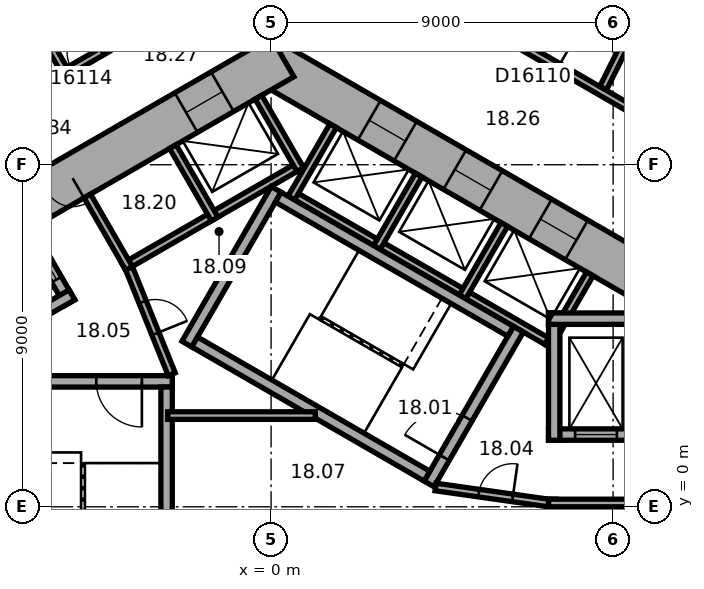
"""IFC4 building model, lengths in metres.
Left out: names, types, materials, properties, quantities, classifications, styles, units other than length and angle.
Written with IfcOpenShell. Run it as: python <this file> out.ifc"""

import sys

from ifc_helpers import new_model, si_unit, direction, frame, frame_2d, origin, place, context, subcontext, project, spatial, rectangle, extrude, element, fill, save


model = new_model("IFC4")
c1 = context("Model", 3, precision=1e-05, world=origin(), true_north=direction((0.0, 1.0)))
c2 = subcontext(c1, "Body", "Model", "MODEL_VIEW")
j1 = project(units=[si_unit("LENGTHUNIT", "METRE"), si_unit("PLANEANGLEUNIT", "RADIAN")], contexts=[c1])
p1 = place(None, origin())
s1 = spatial("IfcSite", under=j1, at=p1, CompositionType="ELEMENT")
p2 = place(p1, origin())
s2 = spatial("IfcBuilding", under=s1, at=p2, CompositionType="ELEMENT")
p3 = place(p2, frame((0.0, 0.0, 83.6)))
s3 = spatial("IfcBuildingStorey", under=s2, at=p3, CompositionType="ELEMENT", Elevation=83.6)
p4 = place(p3, frame((10.4, 5.658, 0.0), z_axis=(0.0, 0.0, 1.0), x_axis=(-0.866021384402, 0.500006961711, 0.0)))
e1 = element("IfcWall", 1, at=p4, inside=s3, PredefinedType="SHEAR", context=c2, shape_type="SweptSolid", body=[
    extrude(rectangle(XDim=12.355, YDim=1.2, at=frame_2d((6.178, 0.0))), origin(), (0.0, 0.0, 1.0), 3.3),
])
p5 = place(p4, frame((2.728, 0.0, 0.0)))
e2 = element("IfcOpeningElement", 2, at=p5, cuts=e1, PredefinedType="OPENING", context=c2, shape_type="SweptSolid", body=[
    extrude(rectangle(XDim=1.1, YDim=2.1, at=frame_2d((0.55, 1.05))), frame((0.0, 0.61, 0.0), z_axis=(0.0, -1.0, 0.0), x_axis=(1.0, 0.0, 0.0)), (0.0, 0.0, 1.0), 1.22),
])
p6 = place(p4, frame((5.328, 0.0, 0.0)))
e3 = element("IfcOpeningElement", 3, at=p6, cuts=e1, PredefinedType="OPENING", context=c2, shape_type="SweptSolid", body=[
    extrude(rectangle(XDim=1.1, YDim=2.1, at=frame_2d((0.55, 1.05))), frame((0.0, 0.61, 0.0), z_axis=(0.0, -1.0, 0.0), x_axis=(1.0, 0.0, 0.0)), (0.0, 0.0, 1.0), 1.22),
])
p7 = place(p4, frame((7.928, 0.0, 0.0)))
e4 = element("IfcOpeningElement", 4, at=p7, cuts=e1, PredefinedType="OPENING", context=c2, shape_type="SweptSolid", body=[
    extrude(rectangle(XDim=1.1, YDim=2.1, at=frame_2d((0.55, 1.05))), frame((0.0, 0.61, 0.0), z_axis=(0.0, -1.0, 0.0), x_axis=(1.0, 0.0, 0.0)), (0.0, 0.0, 1.0), 1.22),
])
p8 = place(p3, frame((0.3, 11.836, 0.0), z_axis=(0.0, 0.0, 1.0), x_axis=(-0.866021384402, -0.500006961711, 0.0)))
e5 = element("IfcWall", 5, at=p8, inside=s3, PredefinedType="SHEAR", context=c2, shape_type="SweptSolid", body=[
    extrude(rectangle(XDim=12.355, YDim=1.2, at=frame_2d((6.178, 0.0))), origin(), (0.0, 0.0, 1.0), 3.3),
])
p9 = place(p8, frame((6.378, 0.0, 0.0)))
e6 = element("IfcOpeningElement", 6, at=p9, cuts=e5, PredefinedType="OPENING", context=c2, shape_type="SweptSolid", body=[
    extrude(rectangle(XDim=1.5, YDim=2.1, at=frame_2d((0.75, 1.05))), frame((0.0, 0.61, 0.0), z_axis=(0.0, -1.0, 0.0), x_axis=(1.0, 0.0, 0.0)), (0.0, 0.0, 1.0), 1.22),
])
p10 = place(p8, frame((1.828, 0.0, 0.0)))
e7 = element("IfcOpeningElement", 7, at=p10, cuts=e5, PredefinedType="OPENING", context=c2, shape_type="SweptSolid", body=[
    extrude(rectangle(XDim=1.1, YDim=2.1, at=frame_2d((0.55, 1.05))), frame((0.0, 0.61, 0.0), z_axis=(0.0, -1.0, 0.0), x_axis=(1.0, 0.0, 0.0)), (0.0, 0.0, 1.0), 1.22),
])
p11 = place(p3, frame((7.4, -5.2, 0.0), z_axis=(0.0, 0.0, 1.0), x_axis=(0.0, 1.0, 0.0)))
e8 = element("IfcWall", 8, at=p11, inside=s3, PredefinedType="PARTITIONING", context=c2, shape_type="SweptSolid", body=[
    extrude(rectangle(XDim=5.4, YDim=0.2, at=frame_2d((2.7, 0.0))), origin(), (0.0, 0.0, 1.0), 3.05),
])
p12 = place(p3, frame((7.3, 0.1, 0.0), z_axis=(0.0, 0.0, 1.0), x_axis=(1.0, 0.0, 0.0)))
e9 = element("IfcWall", 9, at=p12, inside=s3, PredefinedType="PARTITIONING", context=c2, shape_type="SweptSolid", body=[
    extrude(rectangle(XDim=2.2, YDim=0.2, at=frame_2d((1.1, 0.0))), origin(), (0.0, 0.0, 1.0), 3.05),
])
p13 = place(p3, frame((7.424, 4.259, 0.0), z_axis=(0.0, 0.0, 1.0), x_axis=(-0.866026010844, 0.49999894854, 0.0)))
e10 = element("IfcWall", 10, at=p13, inside=s3, PredefinedType="PARTITIONING", context=c2, shape_type="SweptSolid", body=[
    extrude(rectangle(XDim=8.0, YDim=0.2, at=frame_2d((4.0, 0.0))), origin(), (0.0, 0.0, 1.0), 3.05),
])
for number, where, z_axis, x_axis in (
    (11, (7.287, 4.222, 0.0), (0.0, 0.0, 1.0), (0.5, 0.866, 0.0)),
    (12, (5.036, 5.522, 0.0), (0.0, 0.0, 1.0), (0.5, 0.866, 0.0)),
    (13, (2.784, 6.822, 0.0), (0.0, 0.0, 1.0), (0.5, 0.866, 0.0)),
    (14, (0.532, 8.122, 0.0), (0.0, 0.0, 1.0), (0.5, 0.866, 0.0)),
):
    element("IfcWall", number, at=place(p3, frame(where, z_axis=z_axis, x_axis=x_axis)), inside=s3, PredefinedType="PARTITIONING", context=c2, shape_type="SweptSolid", body=[
        extrude(rectangle(XDim=2.2, YDim=0.2, at=frame_2d((1.1, 0.0))), origin(), (0.0, 0.0, 1.0), 3.05),
    ])
p14 = place(p3, frame((0.803, 9.009, 0.0), z_axis=(0.0, 0.0, 1.0), x_axis=(-0.866028230842, -0.499995103361, 0.0)))
e15 = element("IfcWall", 15, at=p14, inside=s3, PredefinedType="PARTITIONING", context=c2, shape_type="SweptSolid", body=[
    extrude(rectangle(XDim=5.4, YDim=0.2, at=frame_2d((2.7, 0.0))), origin(), (0.0, 0.0, 1.0), 3.05),
])
p15 = place(p3, frame((0.767, 8.872, 0.0), z_axis=(0.0, 0.0, 1.0), x_axis=(-0.499994660107, 0.866028486751, 0.0)))
e16 = element("IfcWall", 16, at=p15, inside=s3, PredefinedType="PARTITIONING", context=c2, shape_type="SweptSolid", body=[
    extrude(rectangle(XDim=2.2, YDim=0.2, at=frame_2d((1.1, 0.0))), origin(), (0.0, 0.0, 1.0), 3.05),
])
for number, where, z_axis, x_axis in (
    (17, (-1.485, 7.572, 0.0), (0.0, 0.0, 1.0), (-0.5, 0.866, 0.0)),
    (18, (-3.737, 6.272, 0.0), (0.0, 0.0, 1.0), (-0.5, 0.866, 0.0)),
):
    element("IfcWall", number, at=place(p3, frame(where, z_axis=z_axis, x_axis=x_axis)), inside=s3, PredefinedType="PARTITIONING", context=c2, shape_type="SweptSolid", body=[
        extrude(rectangle(XDim=2.2, YDim=0.2, at=frame_2d((1.1, 0.0))), origin(), (0.0, 0.0, 1.0), 3.05),
    ])
p16 = place(p3, frame((4.158, 0.602, 0.0), z_axis=(0.0, 0.0, 1.0), x_axis=(0.499977259774, 0.866038532462, 0.0)))
e19 = element("IfcWall", 19, at=p16, inside=s3, PredefinedType="SHEAR", context=c2, shape_type="SweptSolid", body=[
    extrude(rectangle(XDim=4.7, YDim=0.3, at=frame_2d((2.35, 0.0))), origin(), (0.0, 0.0, 1.0), 3.05),
])
p17 = place(p16, frame((0.8, 0.0, 0.0)))
e20 = element("IfcOpeningElement", 20, at=p17, cuts=e19, PredefinedType="OPENING", context=c2, shape_type="SweptSolid", body=[
    extrude(rectangle(XDim=1.2, YDim=2.1, at=frame_2d((0.6, 1.05))), frame((0.0, 0.16, 0.0), z_axis=(0.0, -1.0, 0.0), x_axis=(1.0, 0.0, 0.0)), (0.0, 0.0, 1.0), 0.32),
])
p18 = place(p3, frame((-2.216, 4.282, 0.0), z_axis=(0.0, 0.0, 1.0), x_axis=(0.499977259774, 0.866038532462, 0.0)))
e21 = element("IfcWall", 21, at=p18, inside=s3, PredefinedType="SHEAR", context=c2, shape_type="SweptSolid", body=[
    extrude(rectangle(XDim=4.7, YDim=0.3, at=frame_2d((2.35, 0.0))), origin(), (0.0, 0.0, 1.0), 3.05),
])
for number, where, z_axis, x_axis in (
    (22, (4.103, 0.807, 0.0), (0.0, 0.0, 1.0), (-0.866, 0.5, 0.0)),
    (23, (6.303, 4.617, 0.0), (0.0, 0.0, 1.0), (-0.866, 0.5, 0.0)),
):
    element("IfcWall", number, at=place(p3, frame(where, z_axis=z_axis, x_axis=x_axis)), inside=s3, PredefinedType="SHEAR", context=c2, shape_type="SweptSolid", body=[
        extrude(rectangle(XDim=7.06, YDim=0.3, at=frame_2d((3.53, 0.0))), origin(), (0.0, 0.0, 1.0), 3.05),
    ])
p19 = place(p3, frame((-2.6, 3.3, 0.0), z_axis=(0.0, 0.0, 1.0), x_axis=(-1.0, 0.0, 0.0)))
e24 = element("IfcWall", 24, at=p19, inside=s3, PredefinedType="SHEAR", context=c2, shape_type="SweptSolid", body=[
    extrude(rectangle(XDim=4.7, YDim=0.3, at=frame_2d((2.35, 0.0))), origin(), (0.0, 0.0, 1.0), 3.05),
])
p20 = place(p19, frame((0.8, 0.0, 0.0)))
e25 = element("IfcOpeningElement", 25, at=p20, cuts=e24, PredefinedType="OPENING", context=c2, shape_type="SweptSolid", body=[
    extrude(rectangle(XDim=1.2, YDim=2.1, at=frame_2d((0.6, 1.05))), frame((0.0, 0.16, 0.0), z_axis=(0.0, -1.0, 0.0), x_axis=(1.0, 0.0, 0.0)), (0.0, 0.0, 1.0), 0.32),
])
p21 = place(p3, frame((-2.75, 3.15, 0.0), z_axis=(0.0, 0.0, 1.0), x_axis=(0.0, -1.0, 0.0)))
e26 = element("IfcWall", 26, at=p21, inside=s3, PredefinedType="SHEAR", context=c2, shape_type="SweptSolid", body=[
    extrude(rectangle(XDim=7.06, YDim=0.3, at=frame_2d((3.53, 0.0))), origin(), (0.0, 0.0, 1.0), 3.05),
])
p22 = place(p3, frame((7.3, 1.9, 0.0), z_axis=(0.0, 0.0, 1.0), x_axis=(1.0, 0.0, 0.0)))
e27 = element("IfcWall", 27, at=p22, inside=s3, PredefinedType="SHEAR", context=c2, shape_type="SweptSolid", body=[
    extrude(rectangle(XDim=2.2, YDim=0.3, at=frame_2d((1.1, 0.0))), origin(), (0.0, 0.0, 1.0), 3.05),
])
p23 = place(p22, frame((0.7, 0.0, 0.0)))
e28 = element("IfcOpeningElement", 28, at=p23, cuts=e27, PredefinedType="OPENING", context=c2, shape_type="SweptSolid", body=[
    extrude(rectangle(XDim=1.1, YDim=2.1, at=frame_2d((0.55, 1.05))), frame((0.0, 0.16, 0.0), z_axis=(0.0, -1.0, 0.0), x_axis=(1.0, 0.0, 0.0)), (0.0, 0.0, 1.0), 0.32),
])
p24 = place(p3, frame((7.45, 1.75, 0.0), z_axis=(0.0, 0.0, 1.0), x_axis=(0.0, 1.0, 0.0)))
e29 = element("IfcWall", 29, at=p24, inside=s3, PredefinedType="SHEAR", context=c2, shape_type="SweptSolid", body=[
    extrude(rectangle(XDim=3.35, YDim=0.3, at=frame_2d((1.675, 0.0))), origin(), (0.0, 0.0, 1.0), 3.05),
])
p25 = place(p3, frame((7.3, 4.95, 0.0), z_axis=(0.0, 0.0, 1.0), x_axis=(1.0, 0.0, 0.0)))
e30 = element("IfcWall", 30, at=p25, inside=s3, PredefinedType="SHEAR", context=c2, shape_type="SweptSolid", body=[
    extrude(rectangle(XDim=2.2, YDim=0.3, at=frame_2d((1.1, 0.0))), origin(), (0.0, 0.0, 1.0), 3.05),
])
p26 = place(p3, frame((4.327, 0.521, 0.0), z_axis=(0.0, 0.0, 1.0), x_axis=(0.990124376366, -0.14019172346, 0.0)))
e31 = element("IfcWall", 31, at=p26, inside=s3, PredefinedType="PARTITIONING", context=c2, shape_type="SweptSolid", body=[
    extrude(rectangle(XDim=3.002, YDim=0.2, at=frame_2d((1.501, 0.0))), origin(), (0.0, 0.0, 1.0), 3.05),
])
p27 = place(p26, frame((1.15, 0.0, 0.0)))
e32 = element("IfcOpeningElement", 32, at=p27, cuts=e31, PredefinedType="OPENING", context=c2, shape_type="SweptSolid", body=[
    extrude(rectangle(XDim=0.9, YDim=2.1, at=frame_2d((0.45, 1.05))), frame((0.0, 0.11, 0.0), z_axis=(0.0, -1.0, 0.0), x_axis=(1.0, 0.0, 0.0)), (0.0, 0.0, 1.0), 0.22),
])
p28 = place(p3, frame((-5.295, 5.372, 0.0), z_axis=(0.0, 0.0, 1.0), x_axis=(-0.500077893725, 0.86598042715, 0.0)))
e33 = element("IfcWall", 33, at=p28, inside=s3, PredefinedType="SHEAR", context=c2, shape_type="SweptSolid", body=[
    extrude(rectangle(XDim=2.2, YDim=0.3, at=frame_2d((1.1, 0.0))), origin(), (0.0, 0.0, 1.0), 3.05),
])
p29 = place(p28, frame((0.7, 0.0, 0.0)))
e34 = element("IfcOpeningElement", 34, at=p29, cuts=e33, PredefinedType="OPENING", context=c2, shape_type="SweptSolid", body=[
    extrude(rectangle(XDim=1.1, YDim=2.1, at=frame_2d((0.55, 1.05))), frame((0.0, 0.16, 0.0), z_axis=(0.0, -1.0, 0.0), x_axis=(1.0, 0.0, 0.0)), (0.0, 0.0, 1.0), 0.32),
])
p30 = place(p3, frame((-5.24, 5.577, 0.0), z_axis=(0.0, 0.0, 1.0), x_axis=(-0.866014461049, -0.500018952895, 0.0)))
e35 = element("IfcWall", 35, at=p30, inside=s3, PredefinedType="SHEAR", context=c2, shape_type="SweptSolid", body=[
    extrude(rectangle(XDim=3.35, YDim=0.3, at=frame_2d((1.675, 0.0))), origin(), (0.0, 0.0, 1.0), 3.05),
])
p31 = place(p3, frame((-2.615, 3.487, 0.0), z_axis=(0.0, 0.0, 1.0), x_axis=(-0.373576831041, 0.92759924068, 0.0)))
e36 = element("IfcWall", 36, at=p31, inside=s3, PredefinedType="PARTITIONING", context=c2, shape_type="SweptSolid", body=[
    extrude(rectangle(XDim=3.002, YDim=0.2, at=frame_2d((1.501, 0.0))), origin(), (0.0, 0.0, 1.0), 3.05),
])
p32 = place(p31, frame((1.15, 0.0, 0.0)))
e37 = element("IfcOpeningElement", 37, at=p32, cuts=e36, PredefinedType="OPENING", context=c2, shape_type="SweptSolid", body=[
    extrude(rectangle(XDim=0.9, YDim=2.1, at=frame_2d((0.45, 1.05))), frame((0.0, 0.11, 0.0), z_axis=(0.0, -1.0, 0.0), x_axis=(1.0, 0.0, 0.0)), (0.0, 0.0, 1.0), 0.22),
])
p33 = place(p3, frame((-2.72, 2.4, 0.0), z_axis=(0.0, 0.0, 1.0), x_axis=(1.0, 0.0, 0.0)))
e38 = element("IfcWall", 38, at=p33, inside=s3, PredefinedType="PARTITIONING", context=c2, shape_type="SweptSolid", body=[
    extrude(rectangle(XDim=3.883, YDim=0.2, at=frame_2d((1.941, 0.0))), origin(), (0.0, 0.0, 1.0), 3.05),
])
p34 = place(p3, frame((-10.083, 19.524, 0.0), z_axis=(0.0, 0.0, 1.0), x_axis=(0.499999662836, -0.866025598446, 0.0)))
e39 = element("IfcWall", 39, at=p34, inside=s3, PredefinedType="PARTITIONING", context=c2, shape_type="SweptSolid", body=[
    extrude(rectangle(XDim=9.25, YDim=0.2, at=frame_2d((4.625, 0.0))), origin(), (0.0, 0.0, 1.0), 2.6),
])
p35 = place(p3, frame((-4.309, 12.061, 0.0), z_axis=(0.0, 0.0, 1.0), x_axis=(-0.866020679205, -0.500008183122, 0.0)))
e40 = element("IfcWall", 40, at=p35, inside=s3, PredefinedType="PARTITIONING", context=c2, shape_type="SweptSolid", body=[
    extrude(rectangle(XDim=5.104, YDim=0.2, at=frame_2d((2.552, 0.0))), origin(), (0.0, 0.0, 1.0), 3.05),
])
p36 = place(p35, frame((0.185, 0.0, 0.0)))
e41 = element("IfcOpeningElement", 41, at=p36, cuts=e40, PredefinedType="OPENING", context=c2, shape_type="SweptSolid", body=[
    extrude(rectangle(XDim=0.9, YDim=2.1, at=frame_2d((0.45, 1.05))), frame((0.0, 0.11, 0.0), z_axis=(0.0, -1.0, 0.0), x_axis=(1.0, 0.0, 0.0)), (0.0, 0.0, 1.0), 0.22),
])
p37 = place(p35, frame((3.979, 0.0, 0.0)))
e42 = element("IfcOpeningElement", 42, at=p37, cuts=e40, PredefinedType="OPENING", context=c2, shape_type="SweptSolid", body=[
    extrude(rectangle(XDim=0.9, YDim=2.1, at=frame_2d((0.45, 1.05))), frame((0.0, 0.11, 0.0), z_axis=(0.0, -1.0, 0.0), x_axis=(1.0, 0.0, 0.0)), (0.0, 0.0, 1.0), 0.22),
])
p38 = place(p3, frame((10.885, 9.652, 0.0), z_axis=(0.0, 0.0, 1.0), x_axis=(-0.866033277307, 0.499986362411, 0.0)))
e43 = element("IfcWall", 43, at=p38, inside=s3, PredefinedType="PARTITIONING", context=c2, shape_type="SweptSolid", body=[
    extrude(rectangle(XDim=8.702, YDim=0.2, at=frame_2d((4.351, 0.0))), origin(), (0.0, 0.0, 1.0), 3.05),
])
p39 = place(p38, frame((3.844, 0.0, 0.0)))
e44 = element("IfcOpeningElement", 44, at=p39, cuts=e43, PredefinedType="OPENING", context=c2, shape_type="SweptSolid", body=[
    extrude(rectangle(XDim=0.9, YDim=2.1, at=frame_2d((0.45, 1.05))), frame((0.0, 0.11, 0.0), z_axis=(0.0, -1.0, 0.0), x_axis=(1.0, 0.0, 0.0)), (0.0, 0.0, 1.0), 0.22),
])
p40 = place(p3, frame((12.393, 18.348, 0.0), z_axis=(0.0, 0.0, 1.0), x_axis=(-0.446176022699, -0.894945225569, 0.0)))
e45 = element("IfcWall", 45, at=p40, inside=s3, PredefinedType="PARTITIONING", context=c2, shape_type="SweptSolid", body=[
    extrude(rectangle(XDim=8.191, YDim=0.2, at=frame_2d((4.095, 0.0))), origin(), (0.0, 0.0, 1.0), 2.6),
])
p41 = place(p9, origin())
e46 = element("IfcDoor", 46, at=p41, inside=s3, OperationType="DOUBLE_DOOR_SINGLE_SWING", PredefinedType="DOOR", context=c2, shape_type="SweptSolid", body=[
    extrude(rectangle(XDim=1.5, YDim=2.1, at=frame_2d((0.75, 1.05))), frame((0.0, 0.025, 0.0), z_axis=(0.0, -1.0, 0.0), x_axis=(1.0, 0.0, 0.0)), (0.0, 0.0, 1.0), 0.05),
])
fill(e6, e46)
p42 = place(p17, origin())
e47 = element("IfcDoor", 47, at=p42, inside=s3, OperationType="SINGLE_SWING_RIGHT", PredefinedType="DOOR", context=c2, shape_type="SweptSolid", body=[
    extrude(rectangle(XDim=1.2, YDim=2.1, at=frame_2d((0.6, 1.05))), frame((0.0, 0.025, 0.0), z_axis=(0.0, -1.0, 0.0), x_axis=(1.0, 0.0, 0.0)), (0.0, 0.0, 1.0), 0.05),
])
fill(e20, e47)
p43 = place(p20, origin())
e48 = element("IfcDoor", 48, at=p43, inside=s3, OperationType="SINGLE_SWING_RIGHT", PredefinedType="DOOR", context=c2, shape_type="SweptSolid", body=[
    extrude(rectangle(XDim=1.2, YDim=2.1, at=frame_2d((0.6, 1.05))), frame((0.0, 0.025, 0.0), z_axis=(0.0, -1.0, 0.0), x_axis=(1.0, 0.0, 0.0)), (0.0, 0.0, 1.0), 0.05),
])
fill(e25, e48)
p44 = place(p27, origin())
e49 = element("IfcDoor", 49, at=p44, inside=s3, OperationType="SINGLE_SWING_LEFT", PredefinedType="DOOR", context=c2, shape_type="SweptSolid", body=[
    extrude(rectangle(XDim=0.9, YDim=2.1, at=frame_2d((0.45, 1.05))), frame((0.0, 0.025, 0.0), z_axis=(0.0, -1.0, 0.0), x_axis=(1.0, 0.0, 0.0)), (0.0, 0.0, 1.0), 0.05),
])
fill(e32, e49)
p45 = place(p32, origin())
e50 = element("IfcDoor", 50, at=p45, inside=s3, OperationType="SINGLE_SWING_LEFT", PredefinedType="DOOR", context=c2, shape_type="SweptSolid", body=[
    extrude(rectangle(XDim=0.9, YDim=2.1, at=frame_2d((0.45, 1.05))), frame((0.0, 0.025, 0.0), z_axis=(0.0, -1.0, 0.0), x_axis=(1.0, 0.0, 0.0)), (0.0, 0.0, 1.0), 0.05),
])
fill(e37, e50)
p46 = place(p23, origin())
e51 = element("IfcDoor", 51, at=p46, inside=s3, OperationType="DOUBLE_DOOR_SLIDING", PredefinedType="DOOR", context=c2, shape_type="SweptSolid", body=[
    extrude(rectangle(XDim=1.1, YDim=2.1, at=frame_2d((0.55, 1.05))), frame((0.0, 0.025, 0.0), z_axis=(0.0, -1.0, 0.0), x_axis=(1.0, 0.0, 0.0)), (0.0, 0.0, 1.0), 0.05),
])
fill(e28, e51)
p47 = place(p29, origin())
e52 = element("IfcDoor", 52, at=p47, inside=s3, OperationType="DOUBLE_DOOR_SLIDING", PredefinedType="DOOR", context=c2, shape_type="SweptSolid", body=[
    extrude(rectangle(XDim=1.1, YDim=2.1, at=frame_2d((0.55, 1.05))), frame((0.0, 0.025, 0.0), z_axis=(0.0, -1.0, 0.0), x_axis=(1.0, 0.0, 0.0)), (0.0, 0.0, 1.0), 0.05),
])
fill(e34, e52)
p48 = place(p5, origin())
e53 = element("IfcDoor", 53, at=p48, inside=s3, OperationType="DOUBLE_DOOR_SLIDING", PredefinedType="DOOR", context=c2, shape_type="SweptSolid", body=[
    extrude(rectangle(XDim=1.1, YDim=2.1, at=frame_2d((0.55, 1.05))), frame((0.0, 0.025, 0.0), z_axis=(0.0, -1.0, 0.0), x_axis=(1.0, 0.0, 0.0)), (0.0, 0.0, 1.0), 0.05),
])
fill(e2, e53)
p49 = place(p6, origin())
e54 = element("IfcDoor", 54, at=p49, inside=s3, OperationType="DOUBLE_DOOR_SLIDING", PredefinedType="DOOR", context=c2, shape_type="SweptSolid", body=[
    extrude(rectangle(XDim=1.1, YDim=2.1, at=frame_2d((0.55, 1.05))), frame((0.0, 0.025, 0.0), z_axis=(0.0, -1.0, 0.0), x_axis=(1.0, 0.0, 0.0)), (0.0, 0.0, 1.0), 0.05),
])
fill(e3, e54)
p50 = place(p7, origin())
e55 = element("IfcDoor", 55, at=p50, inside=s3, OperationType="DOUBLE_DOOR_SLIDING", PredefinedType="DOOR", context=c2, shape_type="SweptSolid", body=[
    extrude(rectangle(XDim=1.1, YDim=2.1, at=frame_2d((0.55, 1.05))), frame((0.0, 0.025, 0.0), z_axis=(0.0, -1.0, 0.0), x_axis=(1.0, 0.0, 0.0)), (0.0, 0.0, 1.0), 0.05),
])
fill(e4, e55)
p51 = place(p10, origin())
e56 = element("IfcDoor", 56, at=p51, inside=s3, OperationType="DOUBLE_DOOR_SLIDING", PredefinedType="DOOR", context=c2, shape_type="SweptSolid", body=[
    extrude(rectangle(XDim=1.1, YDim=2.1, at=frame_2d((0.55, 1.05))), frame((0.0, 0.025, 0.0), z_axis=(0.0, -1.0, 0.0), x_axis=(1.0, 0.0, 0.0)), (0.0, 0.0, 1.0), 0.05),
])
fill(e7, e56)
p52 = place(p39, origin())
e57 = element("IfcDoor", 57, at=p52, inside=s3, OperationType="SINGLE_SWING_LEFT", PredefinedType="DOOR", context=c2, shape_type="SweptSolid", body=[
    extrude(rectangle(XDim=0.9, YDim=2.1, at=frame_2d((0.45, 1.05))), frame((0.0, 0.025, 0.0), z_axis=(0.0, -1.0, 0.0), x_axis=(1.0, 0.0, 0.0)), (0.0, 0.0, 1.0), 0.05),
])
fill(e44, e57)
p53 = place(p36, origin())
e58 = element("IfcDoor", 58, at=p53, inside=s3, OperationType="SINGLE_SWING_LEFT", PredefinedType="DOOR", context=c2, shape_type="SweptSolid", body=[
    extrude(rectangle(XDim=0.9, YDim=2.1, at=frame_2d((0.45, 1.05))), frame((0.0, 0.025, 0.0), z_axis=(0.0, -1.0, 0.0), x_axis=(1.0, 0.0, 0.0)), (0.0, 0.0, 1.0), 0.05),
])
fill(e41, e58)
save(model, sys.argv[1])
